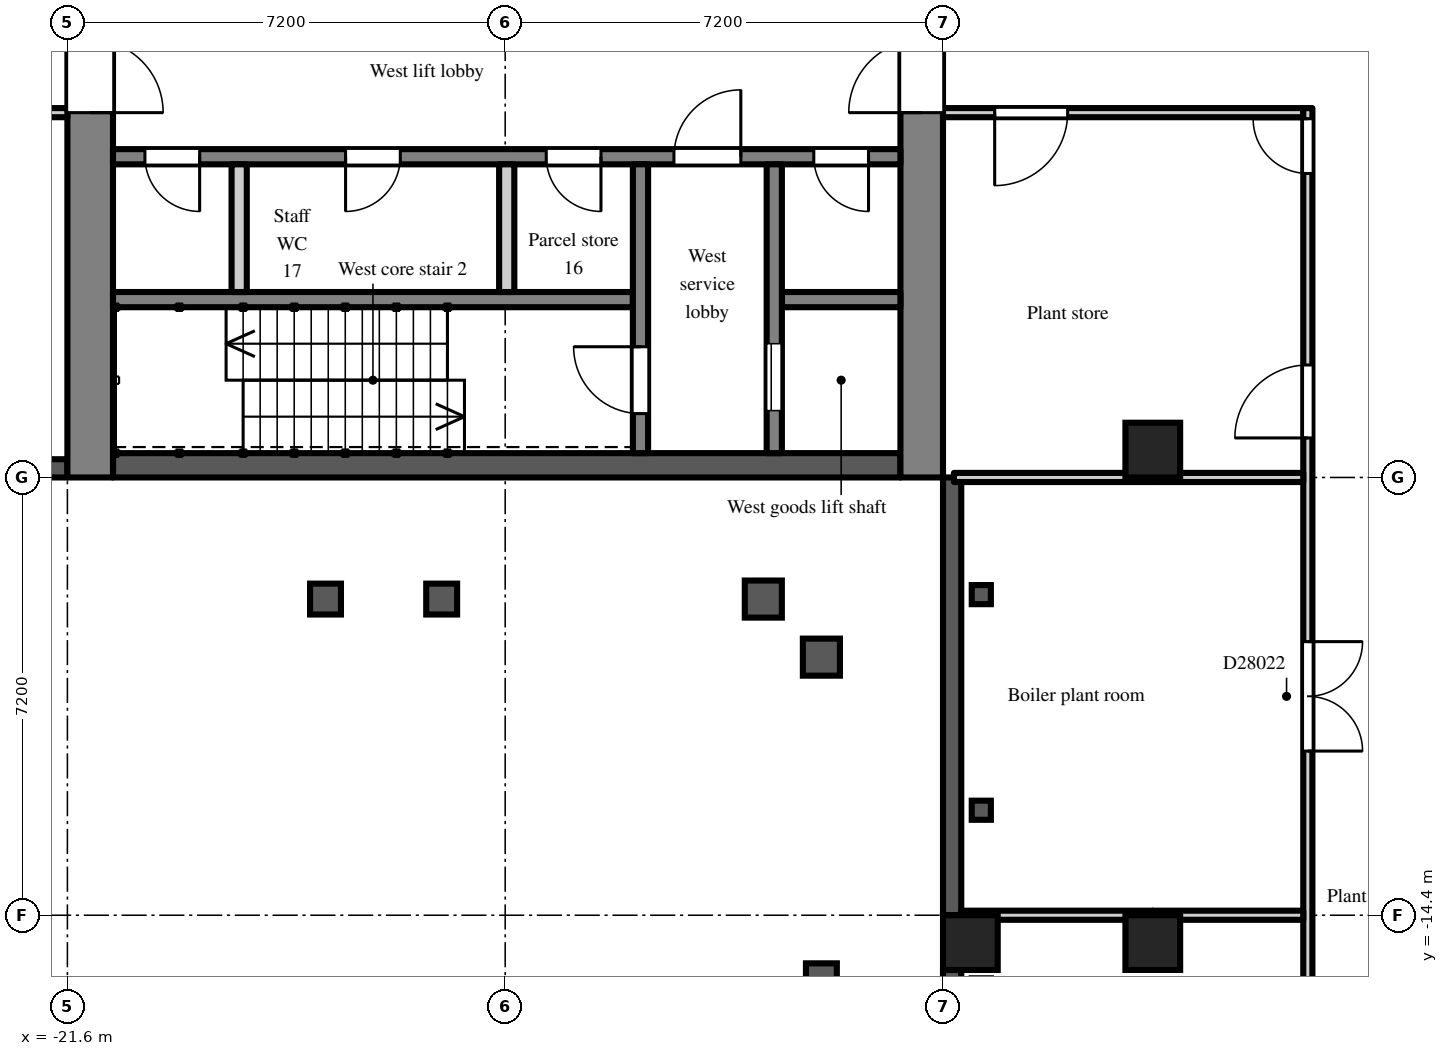
"""IFC4 building model, lengths in metres.
Left out: names, types, materials, properties, quantities, classifications, styles, units other than length and angle.
Written with IfcOpenShell. Run it as: python <this file> out.ifc"""

import sys

from ifc_helpers import new_model, si_unit, direction, frame, frame_2d, origin, origin_2d, place, context, subcontext, project, spatial, polyline, rectangle, outline, extrude, element, fill, save


model = new_model("IFC4")
c1 = context("Model", 3, precision=1e-05, world=origin(), true_north=direction((0.0, 1.0)))
c2 = subcontext(c1, "Body", "Model", "MODEL_VIEW")
j1 = project(units=[si_unit("LENGTHUNIT", "METRE"), si_unit("PLANEANGLEUNIT", "RADIAN")], contexts=[c1])
p1 = place(None, origin())
s1 = spatial("IfcSite", under=j1, at=p1, CompositionType="ELEMENT")
p2 = place(p1, origin())
s2 = spatial("IfcBuilding", under=s1, at=p2, CompositionType="ELEMENT")
p3 = place(p2, frame((0.0, 0.0, 194.7)))
s3 = spatial("IfcBuildingStorey", under=s2, at=p3, CompositionType="ELEMENT", Elevation=194.7)
for number, where, z_axis, x_axis in (
    (1, (-6.75, -14.85, 0.0), (0.0, 0.0, 1.0), (1.0, 0.0, 0.0)),
    (2, (-3.75, -14.85, 0.0), (0.0, 0.0, 1.0), (1.0, 0.0, 0.0)),
    (3, (-3.75, -6.75, 0.0), (0.0, 0.0, 1.0), (1.0, 0.0, 0.0)),
):
    element("IfcColumn", number, at=place(p3, frame(where, z_axis=z_axis, x_axis=x_axis)), inside=s3, PredefinedType="COLUMN", context=c2, shape_type="SweptSolid", body=[
        extrude(rectangle(XDim=0.9, YDim=0.9, at=origin_2d()), origin(), (0.0, 0.0, 1.0), 4.2),
    ])
p4 = place(p3, frame((-24.3, -7.05, 0.0), z_axis=(0.0, 0.0, 1.0), x_axis=(1.0, 0.0, 0.0)))
e4 = element("IfcWall", 4, at=p4, inside=s3, PredefinedType="SOLIDWALL", context=c2, shape_type="SweptSolid", body=[
    extrude(rectangle(XDim=2.7, YDim=0.3, at=frame_2d((1.35, 0.0))), origin(), (0.0, 0.0, 1.0), 3.5),
])
p5 = place(p3, frame((-7.05, -7.2, 0.0), z_axis=(0.0, 0.0, 1.0), x_axis=(0.0, -1.0, 0.0)))
e5 = element("IfcWall", 5, at=p5, inside=s3, PredefinedType="SOLIDWALL", context=c2, shape_type="SweptSolid", body=[
    extrude(rectangle(XDim=7.2, YDim=0.3, at=frame_2d((3.6, 0.0))), origin(), (0.0, 0.0, 1.0), 3.8),
])
p6 = place(p3, frame((-7.05, -15.3, 0.0), z_axis=(0.0, 0.0, 1.0), x_axis=(0.0, -1.0, 0.0)))
e6 = element("IfcWall", 6, at=p6, inside=s3, PredefinedType="SOLIDWALL", context=c2, shape_type="SweptSolid", body=[
    extrude(rectangle(XDim=1.8, YDim=0.3, at=frame_2d((0.9, 0.0))), origin(), (0.0, 0.0, 1.0), 3.5),
])
p7 = place(p3, frame((-7.55, -7.2, 0.0), z_axis=(0.0, 0.0, 1.0), x_axis=(0.0, 1.0, 0.0)))
e7 = element("IfcWall", 7, at=p7, inside=s3, PredefinedType="SHEAR", context=c2, shape_type="SweptSolid", body=[
    extrude(rectangle(XDim=14.4, YDim=0.7, at=frame_2d((7.2, 0.0))), origin(), (0.0, 0.0, 1.0), 3.8),
])
p8 = place(p7, frame((6.0, 0.0, 0.0)))
e8 = element("IfcOpeningElement", 8, at=p8, cuts=e7, PredefinedType="OPENING", context=c2, shape_type="SweptSolid", body=[
    extrude(rectangle(XDim=2.4, YDim=2.2, at=frame_2d((1.2, 1.1))), frame((0.0, 0.36, 0.0), z_axis=(0.0, -1.0, 0.0), x_axis=(1.0, 0.0, 0.0)), (0.0, 0.0, 1.0), 0.72),
])
p9 = place(p3, frame((-21.225, -7.2, 0.0), z_axis=(0.0, 0.0, 1.0), x_axis=(0.0, 1.0, 0.0)))
e9 = element("IfcWall", 9, at=p9, inside=s3, PredefinedType="SHEAR", context=c2, shape_type="SweptSolid", body=[
    extrude(rectangle(XDim=14.4, YDim=0.75, at=frame_2d((7.2, 0.0))), origin(), (0.0, 0.0, 1.0), 3.8),
])
p10 = place(p9, frame((6.0, 0.0, 0.0)))
e10 = element("IfcOpeningElement", 10, at=p10, cuts=e9, PredefinedType="OPENING", context=c2, shape_type="SweptSolid", body=[
    extrude(rectangle(XDim=2.4, YDim=2.2, at=frame_2d((1.2, 1.1))), frame((0.0, 0.385, 0.0), z_axis=(0.0, -1.0, 0.0), x_axis=(1.0, 0.0, 0.0)), (0.0, 0.0, 1.0), 0.77),
])
p11 = place(p3, frame((-7.9, -7.0, 0.0), z_axis=(0.0, 0.0, 1.0), x_axis=(-1.0, 0.0, 0.0)))
e11 = element("IfcWall", 11, at=p11, inside=s3, PredefinedType="SHEAR", context=c2, shape_type="SweptSolid", body=[
    extrude(rectangle(XDim=12.95, YDim=0.4, at=frame_2d((6.475, 0.0))), origin(), (0.0, 0.0, 1.0), 3.8),
])
p12 = place(p3, frame((-7.9, -1.925, 0.0), z_axis=(0.0, 0.0, 1.0), x_axis=(-1.0, 0.0, 0.0)))
e12 = element("IfcWall", 12, at=p12, inside=s3, PredefinedType="SHEAR", context=c2, shape_type="SweptSolid", body=[
    extrude(rectangle(XDim=12.95, YDim=0.25, at=frame_2d((6.475, 0.0))), origin(), (0.0, 0.0, 1.0), 3.8),
])
p13 = place(p12, frame((0.525, 0.0, 0.0)))
e13 = element("IfcOpeningElement", 13, at=p13, cuts=e12, PredefinedType="OPENING", context=c2, shape_type="SweptSolid", body=[
    extrude(rectangle(XDim=0.9, YDim=2.1, at=frame_2d((0.45, 1.05))), frame((0.0, 0.135, 0.0), z_axis=(0.0, -1.0, 0.0), x_axis=(1.0, 0.0, 0.0)), (0.0, 0.0, 1.0), 0.27),
])
p14 = place(p12, frame((2.625, 0.0, 0.0)))
e14 = element("IfcOpeningElement", 14, at=p14, cuts=e12, PredefinedType="OPENING", context=c2, shape_type="SweptSolid", body=[
    extrude(rectangle(XDim=1.1, YDim=2.1, at=frame_2d((0.55, 1.05))), frame((0.0, 0.135, 0.0), z_axis=(0.0, -1.0, 0.0), x_axis=(1.0, 0.0, 0.0)), (0.0, 0.0, 1.0), 0.27),
])
p15 = place(p12, frame((4.925, 0.0, 0.0)))
e15 = element("IfcOpeningElement", 15, at=p15, cuts=e12, PredefinedType="OPENING", context=c2, shape_type="SweptSolid", body=[
    extrude(rectangle(XDim=0.9, YDim=2.1, at=frame_2d((0.45, 1.05))), frame((0.0, 0.135, 0.0), z_axis=(0.0, -1.0, 0.0), x_axis=(1.0, 0.0, 0.0)), (0.0, 0.0, 1.0), 0.27),
])
p16 = place(p12, frame((8.225, 0.0, 0.0)))
e16 = element("IfcOpeningElement", 16, at=p16, cuts=e12, PredefinedType="OPENING", context=c2, shape_type="SweptSolid", body=[
    extrude(rectangle(XDim=0.9, YDim=2.1, at=frame_2d((0.45, 1.05))), frame((0.0, 0.135, 0.0), z_axis=(0.0, -1.0, 0.0), x_axis=(1.0, 0.0, 0.0)), (0.0, 0.0, 1.0), 0.27),
])
p17 = place(p12, frame((11.525, 0.0, 0.0)))
e17 = element("IfcOpeningElement", 17, at=p17, cuts=e12, PredefinedType="OPENING", context=c2, shape_type="SweptSolid", body=[
    extrude(rectangle(XDim=0.9, YDim=2.1, at=frame_2d((0.45, 1.05))), frame((0.0, 0.135, 0.0), z_axis=(0.0, -1.0, 0.0), x_axis=(1.0, 0.0, 0.0)), (0.0, 0.0, 1.0), 0.27),
])
p18 = place(p3, frame((-7.9, -4.275, 0.0), z_axis=(0.0, 0.0, 1.0), x_axis=(-1.0, 0.0, 0.0)))
e18 = element("IfcWall", 18, at=p18, inside=s3, PredefinedType="SHEAR", context=c2, shape_type="SweptSolid", body=[
    extrude(rectangle(XDim=1.95, YDim=0.25, at=frame_2d((0.975, 0.0))), origin(), (0.0, 0.0, 1.0), 3.8),
])
p19 = place(p3, frame((-12.3, -4.275, 0.0), z_axis=(0.0, 0.0, 1.0), x_axis=(-1.0, 0.0, 0.0)))
e19 = element("IfcWall", 19, at=p19, inside=s3, PredefinedType="SHEAR", context=c2, shape_type="SweptSolid", body=[
    extrude(rectangle(XDim=8.55, YDim=0.25, at=frame_2d((4.275, 0.0))), origin(), (0.0, 0.0, 1.0), 3.8),
])
p20 = place(p3, frame((-9.975, -2.05, 0.0), z_axis=(0.0, 0.0, 1.0), x_axis=(0.0, -1.0, 0.0)))
e20 = element("IfcWall", 20, at=p20, inside=s3, PredefinedType="SHEAR", context=c2, shape_type="SweptSolid", body=[
    extrude(rectangle(XDim=4.75, YDim=0.25, at=frame_2d((2.375, 0.0))), origin(), (0.0, 0.0, 1.0), 3.8),
])
p21 = place(p20, frame((2.95, 0.0, 0.0)))
e21 = element("IfcOpeningElement", 21, at=p21, cuts=e20, PredefinedType="OPENING", context=c2, shape_type="SweptSolid", body=[
    extrude(rectangle(XDim=1.1, YDim=2.1, at=frame_2d((0.55, 1.05))), frame((0.0, 0.135, 0.0), z_axis=(0.0, -1.0, 0.0), x_axis=(1.0, 0.0, 0.0)), (0.0, 0.0, 1.0), 0.27),
])
p22 = place(p3, frame((-12.175, -2.05, 0.0), z_axis=(0.0, 0.0, 1.0), x_axis=(0.0, -1.0, 0.0)))
e22 = element("IfcWall", 22, at=p22, inside=s3, PredefinedType="SHEAR", context=c2, shape_type="SweptSolid", body=[
    extrude(rectangle(XDim=4.75, YDim=0.25, at=frame_2d((2.375, 0.0))), origin(), (0.0, 0.0, 1.0), 3.8),
])
p23 = place(p22, frame((3.0, 0.0, 0.0)))
e23 = element("IfcOpeningElement", 23, at=p23, cuts=e22, PredefinedType="OPENING", context=c2, shape_type="SweptSolid", body=[
    extrude(rectangle(XDim=1.1, YDim=2.1, at=frame_2d((0.55, 1.05))), frame((0.0, 0.135, 0.0), z_axis=(0.0, -1.0, 0.0), x_axis=(1.0, 0.0, 0.0)), (0.0, 0.0, 1.0), 0.27),
])
for number, where, z_axis, x_axis in (
    (24, (-14.375, -2.05, 0.0), (0.0, 0.0, 1.0), (0.0, -1.0, 0.0)),
    (25, (-18.775, -2.05, 0.0), (0.0, 0.0, 1.0), (0.0, -1.0, 0.0)),
):
    element("IfcWall", number, at=place(p3, frame(where, z_axis=z_axis, x_axis=x_axis)), inside=s3, PredefinedType="PARTITIONING", context=c2, shape_type="SweptSolid", body=[
        extrude(rectangle(XDim=2.1, YDim=0.25, at=frame_2d((1.05, 0.0))), origin(), (0.0, 0.0, 1.0), 3.8),
    ])
p24 = place(p3, frame((-36.5, -1.2, 0.0), z_axis=(0.0, 0.0, 1.0), x_axis=(1.0, 0.0, 0.0)))
e26 = element("IfcWall", 26, at=p24, inside=s3, PredefinedType="PARTITIONING", context=c2, shape_type="SweptSolid", body=[
    extrude(outline(polyline([(0.0, 0.0), (14.9, 0.0), (14.9, 3.8), (6.102, 3.8), (6.1, 3.4), (5.3, 3.4), (5.298, 3.8), (0.0, 3.8), (0.0, 0.0)])), frame((0.0, 0.075, 0.0), z_axis=(0.0, -1.0, 0.0), x_axis=(1.0, 0.0, 0.0)), (0.0, 0.0, 1.0), 0.15),
])
p25 = place(p24, frame((6.8, 0.0, 0.0)))
e27 = element("IfcOpeningElement", 27, at=p25, cuts=e26, PredefinedType="OPENING", context=c2, shape_type="SweptSolid", body=[
    extrude(rectangle(XDim=1.8, YDim=2.1, at=frame_2d((0.9, 1.05))), frame((0.0, 0.085, 0.0), z_axis=(0.0, -1.0, 0.0), x_axis=(1.0, 0.0, 0.0)), (0.0, 0.0, 1.0), 0.17),
])
p26 = place(p24, frame((12.45, 0.0, 0.0)))
e28 = element("IfcOpeningElement", 28, at=p26, cuts=e26, PredefinedType="OPENING", context=c2, shape_type="SweptSolid", body=[
    extrude(rectangle(XDim=1.8, YDim=2.1, at=frame_2d((0.9, 1.05))), frame((0.0, 0.085, 0.0), z_axis=(0.0, -1.0, 0.0), x_axis=(1.0, 0.0, 0.0)), (0.0, 0.0, 1.0), 0.17),
])
p27 = place(p24, frame((1.15, 0.0, 0.0)))
e29 = element("IfcOpeningElement", 29, at=p27, cuts=e26, PredefinedType="OPENING", context=c2, shape_type="SweptSolid", body=[
    extrude(rectangle(XDim=1.8, YDim=2.1, at=frame_2d((0.9, 1.05))), frame((0.0, 0.085, 0.0), z_axis=(0.0, -1.0, 0.0), x_axis=(1.0, 0.0, 0.0)), (0.0, 0.0, 1.0), 0.17),
])
p28 = place(p3, frame((-7.2, -1.2, 0.0), z_axis=(0.0, 0.0, 1.0), x_axis=(1.0, 0.0, 0.0)))
e30 = element("IfcWall", 30, at=p28, inside=s3, PredefinedType="PARTITIONING", context=c2, shape_type="SweptSolid", body=[
    extrude(rectangle(XDim=5.925, YDim=0.15, at=frame_2d((2.962, 0.0))), origin(), (0.0, 0.0, 1.0), 3.8),
])
p29 = place(p28, frame((0.85, 0.0, 0.0)))
e31 = element("IfcOpeningElement", 31, at=p29, cuts=e30, PredefinedType="OPENING", context=c2, shape_type="SweptSolid", body=[
    extrude(rectangle(XDim=1.2, YDim=2.1, at=frame_2d((0.6, 1.05))), frame((0.0, 0.085, 0.0), z_axis=(0.0, -1.0, 0.0), x_axis=(1.0, 0.0, 0.0)), (0.0, 0.0, 1.0), 0.17),
])
p30 = place(p3, frame((-6.9, -14.4, 0.0), z_axis=(0.0, 0.0, 1.0), x_axis=(1.0, 0.0, 0.0)))
e32 = element("IfcWall", 32, at=p30, inside=s3, PredefinedType="PARTITIONING", context=c2, shape_type="SweptSolid", body=[
    extrude(rectangle(XDim=3.15, YDim=0.15, at=frame_2d((1.575, 0.0))), origin(), (0.0, 0.0, 1.0), 3.5),
])
p31 = place(p3, frame((-7.02, -7.2, 0.0), z_axis=(0.0, 0.0, 1.0), x_axis=(1.0, 0.0, 0.0)))
e33 = element("IfcWall", 33, at=p31, inside=s3, PredefinedType="PARTITIONING", context=c2, shape_type="SweptSolid", body=[
    extrude(rectangle(XDim=3.27, YDim=0.15, at=frame_2d((1.635, 0.0))), origin(), (0.0, 0.0, 1.0), 3.5),
])
p32 = place(p3, frame((-1.2, -21.42, 0.0), z_axis=(0.0, 0.0, 1.0), x_axis=(0.0, 1.0, 0.0)))
e34 = element("IfcWall", 34, at=p32, inside=s3, PredefinedType="PARTITIONING", context=c2, shape_type="SweptSolid", body=[
    extrude(rectangle(XDim=20.295, YDim=0.15, at=frame_2d((10.147, 0.0))), origin(), (0.0, 0.0, 1.0), 3.8),
])
p33 = place(p32, frame((14.87, 0.0, 0.0)))
e35 = element("IfcOpeningElement", 35, at=p33, cuts=e34, PredefinedType="OPENING", context=c2, shape_type="SweptSolid", body=[
    extrude(rectangle(XDim=1.2, YDim=2.1, at=frame_2d((0.6, 1.05))), frame((0.0, 0.085, 0.0), z_axis=(0.0, -1.0, 0.0), x_axis=(1.0, 0.0, 0.0)), (0.0, 0.0, 1.0), 0.17),
])
p34 = place(p32, frame((19.22, 0.0, 0.0)))
e36 = element("IfcOpeningElement", 36, at=p34, cuts=e34, PredefinedType="OPENING", context=c2, shape_type="SweptSolid", body=[
    extrude(rectangle(XDim=0.9, YDim=2.1, at=frame_2d((0.45, 1.05))), frame((0.0, 0.085, 0.0), z_axis=(0.0, -1.0, 0.0), x_axis=(1.0, 0.0, 0.0)), (0.0, 0.0, 1.0), 0.17),
])
p35 = place(p32, frame((9.72, 0.0, 0.0)))
e37 = element("IfcOpeningElement", 37, at=p35, cuts=e34, PredefinedType="OPENING", context=c2, shape_type="SweptSolid", body=[
    extrude(rectangle(XDim=1.8, YDim=2.1, at=frame_2d((0.9, 1.05))), frame((0.0, 0.085, 0.0), z_axis=(0.0, -1.0, 0.0), x_axis=(1.0, 0.0, 0.0)), (0.0, 0.0, 1.0), 0.17),
])
p36 = place(p32, frame((0.77, 0.0, 0.0)))
e38 = element("IfcOpeningElement", 38, at=p36, cuts=e34, PredefinedType="OPENING", context=c2, shape_type="SweptSolid", body=[
    extrude(rectangle(XDim=1.2, YDim=2.1, at=frame_2d((0.6, 1.05))), frame((0.0, 0.085, 0.0), z_axis=(0.0, -1.0, 0.0), x_axis=(1.0, 0.0, 0.0)), (0.0, 0.0, 1.0), 0.17),
])
p37 = place(p32, frame((2.67, 0.0, 0.0)))
e39 = element("IfcOpeningElement", 39, at=p37, cuts=e34, PredefinedType="OPENING", context=c2, shape_type="SweptSolid", body=[
    extrude(rectangle(XDim=1.8, YDim=2.1, at=frame_2d((0.9, 1.05))), frame((0.0, 0.085, 0.0), z_axis=(0.0, -1.0, 0.0), x_axis=(1.0, 0.0, 0.0)), (0.0, 0.0, 1.0), 0.17),
])
for number, where, z_axis, x_axis in (
    (40, (-3.75, -14.4, 0.0), (0.0, 0.0, 1.0), (1.0, 0.0, 0.0)),
    (41, (-3.75, -7.2, 0.0), (0.0, 0.0, 1.0), (1.0, 0.0, 0.0)),
):
    element("IfcWall", number, at=place(p3, frame(where, z_axis=z_axis, x_axis=x_axis)), inside=s3, PredefinedType="PARTITIONING", context=c2, shape_type="SweptSolid", body=[
        extrude(rectangle(XDim=2.475, YDim=0.15, at=frame_2d((1.238, 0.0))), origin(), (0.0, 0.0, 1.0), 3.8),
    ])
p38 = place(p21, origin())
e42 = element("IfcDoor", 42, at=p38, inside=s3, OperationType="SLIDING_TO_LEFT", PredefinedType="DOOR", context=c2, shape_type="SweptSolid", body=[
    extrude(rectangle(XDim=1.1, YDim=2.1, at=frame_2d((0.55, 1.05))), frame((0.0, 0.025, 0.0), z_axis=(0.0, -1.0, 0.0), x_axis=(1.0, 0.0, 0.0)), (0.0, 0.0, 1.0), 0.05),
])
fill(e21, e42)
p39 = place(p23, frame((1.1, 0.0, 0.0), z_axis=(0.0, 0.0, 1.0), x_axis=(-1.0, 0.0, 0.0)))
e43 = element("IfcDoor", 43, at=p39, inside=s3, OperationType="SINGLE_SWING_RIGHT", PredefinedType="DOOR", context=c2, shape_type="SweptSolid", body=[
    extrude(rectangle(XDim=1.1, YDim=2.1, at=frame_2d((0.55, 1.05))), frame((0.0, 0.025, 0.0), z_axis=(0.0, -1.0, 0.0), x_axis=(1.0, 0.0, 0.0)), (0.0, 0.0, 1.0), 0.05),
])
fill(e23, e43)
p40 = place(p13, origin())
e44 = element("IfcDoor", 44, at=p40, inside=s3, OperationType="SINGLE_SWING_LEFT", PredefinedType="DOOR", context=c2, shape_type="SweptSolid", body=[
    extrude(rectangle(XDim=0.9, YDim=2.1, at=frame_2d((0.45, 1.05))), frame((0.0, 0.025, 0.0), z_axis=(0.0, -1.0, 0.0), x_axis=(1.0, 0.0, 0.0)), (0.0, 0.0, 1.0), 0.05),
])
fill(e13, e44)
p41 = place(p14, frame((1.1, 0.0, 0.0), z_axis=(0.0, 0.0, 1.0), x_axis=(-1.0, 0.0, 0.0)))
e45 = element("IfcDoor", 45, at=p41, inside=s3, OperationType="SINGLE_SWING_RIGHT", PredefinedType="DOOR", context=c2, shape_type="SweptSolid", body=[
    extrude(rectangle(XDim=1.1, YDim=2.1, at=frame_2d((0.55, 1.05))), frame((0.0, 0.025, 0.0), z_axis=(0.0, -1.0, 0.0), x_axis=(1.0, 0.0, 0.0)), (0.0, 0.0, 1.0), 0.05),
])
fill(e14, e45)
p42 = place(p8, origin())
e46 = element("IfcDoor", 46, at=p42, inside=s3, OperationType="DOUBLE_DOOR_DOUBLE_SWING", PredefinedType="DOOR", context=c2, shape_type="SweptSolid", body=[
    extrude(rectangle(XDim=2.4, YDim=2.2, at=frame_2d((1.2, 1.1))), frame((0.0, 0.025, 0.0), z_axis=(0.0, -1.0, 0.0), x_axis=(1.0, 0.0, 0.0)), (0.0, 0.0, 1.0), 0.05),
])
fill(e8, e46)
p43 = place(p10, frame((2.4, 0.0, 0.0), z_axis=(0.0, 0.0, 1.0), x_axis=(-1.0, 0.0, 0.0)))
e47 = element("IfcDoor", 47, at=p43, inside=s3, OperationType="DOUBLE_DOOR_DOUBLE_SWING", PredefinedType="DOOR", context=c2, shape_type="SweptSolid", body=[
    extrude(rectangle(XDim=2.4, YDim=2.2, at=frame_2d((1.2, 1.1))), frame((0.0, 0.025, 0.0), z_axis=(0.0, -1.0, 0.0), x_axis=(1.0, 0.0, 0.0)), (0.0, 0.0, 1.0), 0.05),
])
fill(e10, e47)
p44 = place(p15, origin())
e48 = element("IfcDoor", 48, at=p44, inside=s3, OperationType="SINGLE_SWING_LEFT", PredefinedType="DOOR", context=c2, shape_type="SweptSolid", body=[
    extrude(rectangle(XDim=0.9, YDim=2.1, at=frame_2d((0.45, 1.05))), frame((0.0, 0.025, 0.0), z_axis=(0.0, -1.0, 0.0), x_axis=(1.0, 0.0, 0.0)), (0.0, 0.0, 1.0), 0.05),
])
fill(e15, e48)
p45 = place(p16, origin())
e49 = element("IfcDoor", 49, at=p45, inside=s3, OperationType="SINGLE_SWING_RIGHT", PredefinedType="DOOR", context=c2, shape_type="SweptSolid", body=[
    extrude(rectangle(XDim=0.9, YDim=2.1, at=frame_2d((0.45, 1.05))), frame((0.0, 0.025, 0.0), z_axis=(0.0, -1.0, 0.0), x_axis=(1.0, 0.0, 0.0)), (0.0, 0.0, 1.0), 0.05),
])
fill(e16, e49)
p46 = place(p17, origin())
e50 = element("IfcDoor", 50, at=p46, inside=s3, OperationType="SINGLE_SWING_LEFT", PredefinedType="DOOR", context=c2, shape_type="SweptSolid", body=[
    extrude(rectangle(XDim=0.9, YDim=2.1, at=frame_2d((0.45, 1.05))), frame((0.0, 0.025, 0.0), z_axis=(0.0, -1.0, 0.0), x_axis=(1.0, 0.0, 0.0)), (0.0, 0.0, 1.0), 0.05),
])
fill(e17, e50)
p47 = place(p29, frame((1.2, 0.0, 0.0), z_axis=(0.0, 0.0, 1.0), x_axis=(-1.0, 0.0, 0.0)))
e51 = element("IfcDoor", 51, at=p47, inside=s3, OperationType="SINGLE_SWING_RIGHT", PredefinedType="DOOR", context=c2, shape_type="SweptSolid", body=[
    extrude(rectangle(XDim=1.2, YDim=2.1, at=frame_2d((0.6, 1.05))), frame((0.0, 0.025, 0.0), z_axis=(0.0, -1.0, 0.0), x_axis=(1.0, 0.0, 0.0)), (0.0, 0.0, 1.0), 0.05),
])
fill(e31, e51)
p48 = place(p33, origin())
e52 = element("IfcDoor", 52, at=p48, inside=s3, OperationType="SINGLE_SWING_LEFT", PredefinedType="DOOR", context=c2, shape_type="SweptSolid", body=[
    extrude(rectangle(XDim=1.2, YDim=2.1, at=frame_2d((0.6, 1.05))), frame((0.0, 0.025, 0.0), z_axis=(0.0, -1.0, 0.0), x_axis=(1.0, 0.0, 0.0)), (0.0, 0.0, 1.0), 0.05),
])
fill(e35, e52)
p49 = place(p34, origin())
e53 = element("IfcDoor", 53, at=p49, inside=s3, OperationType="SINGLE_SWING_RIGHT", PredefinedType="DOOR", context=c2, shape_type="SweptSolid", body=[
    extrude(rectangle(XDim=0.9, YDim=2.1, at=frame_2d((0.45, 1.05))), frame((0.0, 0.025, 0.0), z_axis=(0.0, -1.0, 0.0), x_axis=(1.0, 0.0, 0.0)), (0.0, 0.0, 1.0), 0.05),
])
fill(e36, e53)
p50 = place(p35, frame((1.8, 0.0, 0.0), z_axis=(0.0, 0.0, 1.0), x_axis=(-1.0, 0.0, 0.0)))
e54 = element("IfcDoor", 54, at=p50, inside=s3, OperationType="DOUBLE_DOOR_DOUBLE_SWING", PredefinedType="DOOR", context=c2, shape_type="SweptSolid", body=[
    extrude(rectangle(XDim=1.8, YDim=2.1, at=frame_2d((0.9, 1.05))), frame((0.0, 0.025, 0.0), z_axis=(0.0, -1.0, 0.0), x_axis=(1.0, 0.0, 0.0)), (0.0, 0.0, 1.0), 0.05),
])
fill(e37, e54)
save(model, sys.argv[1])
